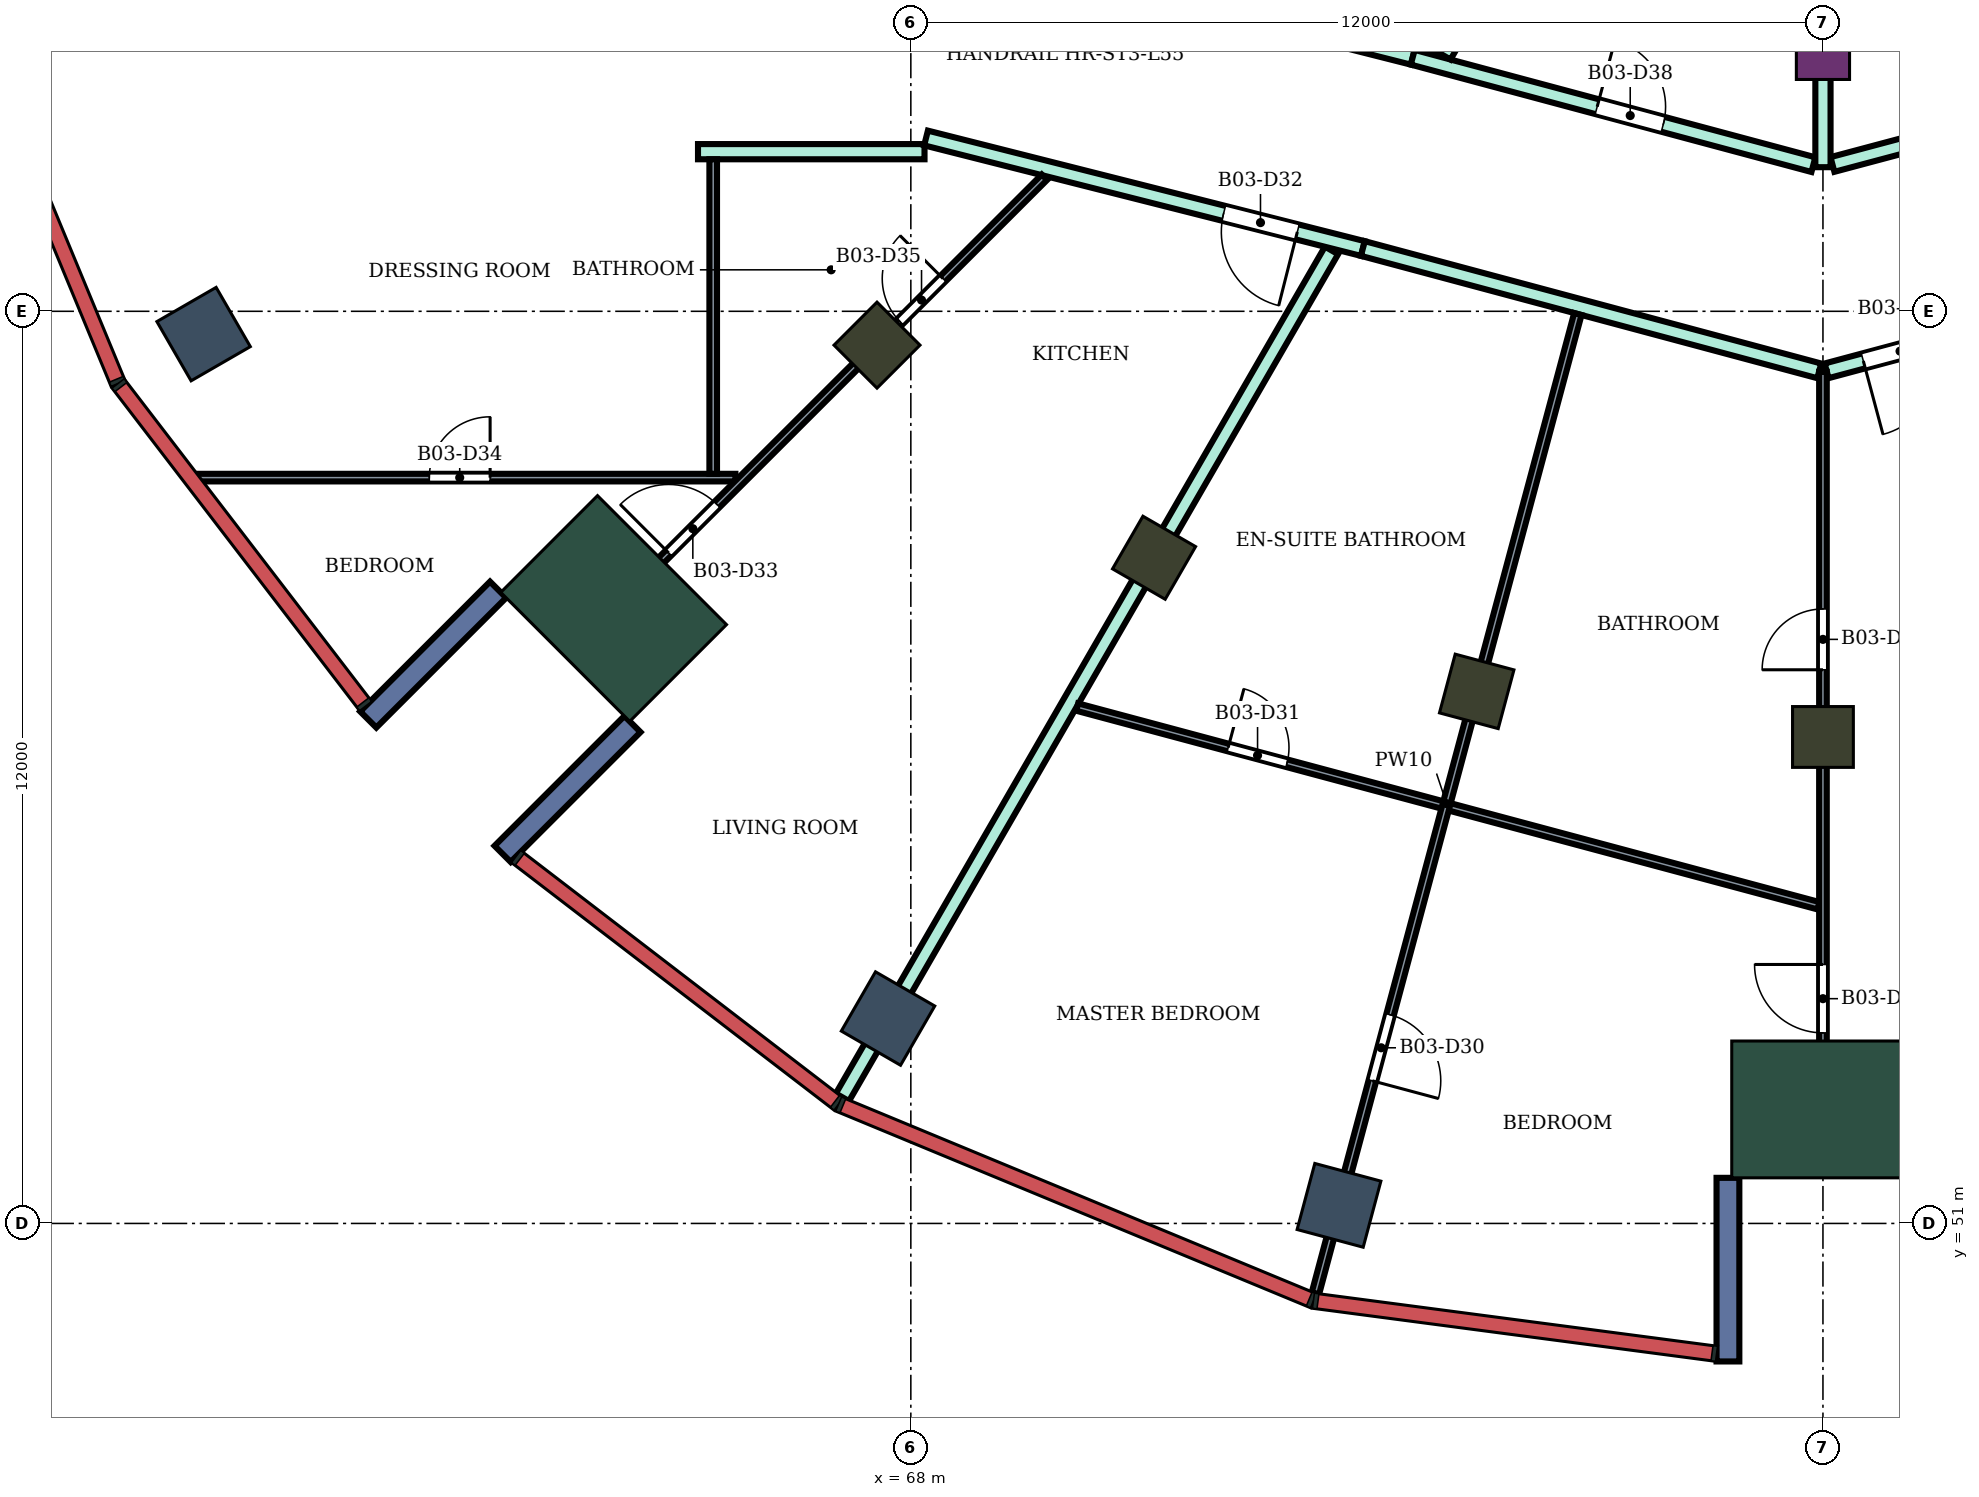
"""IFC4 building model, lengths in metres.
Left out: names, types, materials, properties, quantities, classifications, styles, units other than length and angle.
Written with IfcOpenShell. Run it as: python <this file> out.ifc"""

import sys

from ifc_helpers import new_model, si_unit, direction, frame, frame_2d, origin, origin_2d, place, context, subcontext, project, spatial, rectangle, extrude, element, fill, save


model = new_model("IFC4")
c1 = context("Model", 3, precision=1e-05, world=origin(), true_north=direction((0.0, 1.0)))
c2 = subcontext(c1, "Body", "Model", "MODEL_VIEW")
j1 = project(units=[si_unit("LENGTHUNIT", "METRE"), si_unit("PLANEANGLEUNIT", "RADIAN")], contexts=[c1])
p1 = place(None, origin())
s1 = spatial("IfcSite", under=j1, at=p1, CompositionType="ELEMENT")
p2 = place(p1, origin())
s2 = spatial("IfcBuilding", under=s1, at=p2, CompositionType="ELEMENT")
p3 = place(p2, frame((0.0, 0.0, 241.5)))
s3 = spatial("IfcBuildingStorey", under=s2, at=p3, CompositionType="ELEMENT", Elevation=241.5)
for number, where, z_axis, x_axis in (
    (1, (58.696, 62.7, 0.0), (0.0, 0.0, 1.0), (-0.866, -0.5, 0.0)),
    (2, (67.7, 53.696, 0.0), (0.0, 0.0, 1.0), (-0.5, -0.866, 0.0)),
    (3, (73.633, 51.238, 0.0), (0.0, 0.0, 1.0), (-0.259, -0.966, 0.0)),
):
    element("IfcColumn", number, at=place(p3, frame(where, z_axis=z_axis, x_axis=x_axis)), inside=s3, PredefinedType="COLUMN", context=c2, shape_type="SweptSolid", body=[
        extrude(rectangle(XDim=0.9, YDim=0.9, at=origin_2d()), origin(), (0.0, 0.0, 1.0), 4.2),
    ])
for number, where, z_axis, x_axis in (
    (4, (67.555, 62.555, 0.0), (0.0, 0.0, 1.0), (-0.707, -0.707, 0.0)),
    (5, (71.2, 59.758, 0.0), (0.0, 0.0, 1.0), (-0.5, -0.866, 0.0)),
    (6, (75.445, 58.0, 0.0), (0.0, 0.0, 1.0), (-0.259, -0.966, 0.0)),
    (7, (80.0, 57.4, 0.0), (0.0, 0.0, 1.0), (0.0, -1.0, 0.0)),
):
    element("IfcColumn", number, at=place(p3, frame(where, z_axis=z_axis, x_axis=x_axis)), inside=s3, PredefinedType="COLUMN", context=c2, shape_type="SweptSolid", body=[
        extrude(rectangle(XDim=0.8, YDim=0.8, at=origin_2d()), origin(), (0.0, 0.0, 1.0), 4.2),
    ])
p4 = place(p3, frame((80.0, 66.4, 0.0), z_axis=(0.0, 0.0, 1.0), x_axis=(0.0, -1.0, 0.0)))
e8 = element("IfcColumn", 8, at=p4, inside=s3, PredefinedType="COLUMN", context=c2, shape_type="SweptSolid", body=[
    extrude(rectangle(XDim=0.7, YDim=0.7, at=origin_2d()), origin(), (0.0, 0.0, 1.0), 4.2),
])
for number, where, z_axis, x_axis in (
    (9, (64.09, 59.09, 0.0), (0.0, 0.0, 1.0), (-0.707, -0.707, 0.0)),
    (10, (80.0, 52.5, 0.0), (0.0, 0.0, 1.0), (0.0, -1.0, 0.0)),
):
    element("IfcColumn", number, at=place(p3, frame(where, z_axis=z_axis, x_axis=x_axis)), inside=s3, PredefinedType="COLUMN", context=c2, shape_type="SweptSolid", body=[
        extrude(rectangle(XDim=1.8, YDim=2.4, at=origin_2d()), origin(), (0.0, 0.0, 1.0), 4.2),
    ])
for number, where, z_axis, x_axis in (
    (11, (62.57, 59.338, 0.0), (0.0, 0.0, 1.0), (-0.707, -0.707, 0.0)),
    (12, (64.338, 57.57, 0.0), (0.0, 0.0, 1.0), (-0.707, -0.707, 0.0)),
    (13, (78.75, 51.6, 0.0), (0.0, 0.0, 1.0), (0.0, -1.0, 0.0)),
):
    element("IfcWall", number, at=place(p3, frame(where, z_axis=z_axis, x_axis=x_axis)), inside=s3, PredefinedType="NOTDEFINED", context=c2, shape_type="SweptSolid", body=[
        extrude(rectangle(XDim=2.416, YDim=0.3, at=frame_2d((1.208, 0.0))), origin(), (0.0, 0.0, 1.0), 4.2),
    ])
p5 = place(p3, frame((65.2, 65.1, 0.0), z_axis=(0.0, 0.0, 1.0), x_axis=(1.0, 0.0, 0.0)))
e14 = element("IfcWall", 14, at=p5, inside=s3, PredefinedType="PARTITIONING", context=c2, shape_type="SweptSolid", body=[
    extrude(rectangle(XDim=2.98, YDim=0.2, at=frame_2d((1.49, 0.0))), origin(), (0.0, 0.0, 1.0), 3.75),
])
p6 = place(p3, frame((67.1, 52.659, 0.0), z_axis=(0.0, 0.0, 1.0), x_axis=(0.500128690501, 0.865951091539, 0.0)))
e15 = element("IfcWall", 15, at=p6, inside=s3, PredefinedType="PARTITIONING", context=c2, shape_type="SweptSolid", body=[
    extrude(rectangle(XDim=12.866, YDim=0.2, at=frame_2d((6.433, 0.0))), origin(), (0.0, 0.0, 1.0), 3.75),
])
p7 = place(p3, frame((68.2, 65.28, 0.0), z_axis=(0.0, 0.0, 1.0), x_axis=(0.969450596516, -0.245286650503, 0.0)))
e16 = element("IfcWall", 16, at=p7, inside=s3, PredefinedType="PARTITIONING", context=c2, shape_type="SweptSolid", body=[
    extrude(rectangle(XDim=5.928, YDim=0.2, at=frame_2d((2.964, 0.0))), origin(), (0.0, 0.0, 1.0), 3.75),
])
p8 = place(p7, frame((4.039, 0.0, 0.0)))
e17 = element("IfcOpeningElement", 17, at=p8, cuts=e16, PredefinedType="OPENING", context=c2, shape_type="SweptSolid", body=[
    extrude(rectangle(XDim=1.0, YDim=2.1, at=frame_2d((0.5, 1.05))), frame((0.0, 0.11, 0.0), z_axis=(0.0, -1.0, 0.0), x_axis=(1.0, 0.0, 0.0)), (0.0, 0.0, 1.0), 0.22),
])
p9 = place(p3, frame((72.1, 66.975, 0.0), z_axis=(0.0, 0.0, 1.0), x_axis=(0.969471314457, -0.245204752086, 0.0)))
e18 = element("IfcWall", 18, at=p9, inside=s3, PredefinedType="PARTITIONING", context=c2, shape_type="SweptSolid", body=[
    extrude(rectangle(XDim=2.582, YDim=0.2, at=frame_2d((1.291, 0.0))), origin(), (0.0, 0.0, 1.0), 3.75),
])
p10 = place(p9, frame((0.841, 0.0, 0.0)))
e19 = element("IfcOpeningElement", 19, at=p10, cuts=e18, PredefinedType="OPENING", context=c2, shape_type="SweptSolid", body=[
    extrude(rectangle(XDim=0.9, YDim=2.1, at=frame_2d((0.45, 1.05))), frame((0.0, 0.11, 0.0), z_axis=(0.0, -1.0, 0.0), x_axis=(1.0, 0.0, 0.0)), (0.0, 0.0, 1.0), 0.22),
])
p11 = place(p3, frame((73.947, 63.826, 0.0), z_axis=(0.0, 0.0, 1.0), x_axis=(0.965908253407, -0.258884619088, 0.0)))
e20 = element("IfcWall", 20, at=p11, inside=s3, PredefinedType="PARTITIONING", context=c2, shape_type="SweptSolid", body=[
    extrude(rectangle(XDim=6.217, YDim=0.2, at=frame_2d((3.108, 0.0))), origin(), (0.0, 0.0, 1.0), 3.75),
])
p12 = place(p3, frame((74.603, 66.342, 0.0), z_axis=(0.0, 0.0, 1.0), x_axis=(0.965920893652, -0.258837453254, 0.0)))
e21 = element("IfcWall", 21, at=p12, inside=s3, PredefinedType="PARTITIONING", context=c2, shape_type="SweptSolid", body=[
    extrude(rectangle(XDim=5.458, YDim=0.2, at=frame_2d((2.729, 0.0))), origin(), (0.0, 0.0, 1.0), 3.75),
])
p13 = place(p12, frame((2.512, 0.0, 0.0)))
e22 = element("IfcOpeningElement", 22, at=p13, cuts=e21, PredefinedType="OPENING", context=c2, shape_type="SweptSolid", body=[
    extrude(rectangle(XDim=0.9, YDim=2.1, at=frame_2d((0.45, 1.05))), frame((0.0, 0.11, 0.0), z_axis=(0.0, -1.0, 0.0), x_axis=(1.0, 0.0, 0.0)), (0.0, 0.0, 1.0), 0.22),
])
p14 = place(p3, frame((75.014, 66.362, 0.0), z_axis=(0.0, 0.0, 1.0), x_axis=(0.500097042406, 0.865969369075, 0.0)))
e23 = element("IfcWall", 23, at=p14, inside=s3, PredefinedType="PARTITIONING", context=c2, shape_type="SweptSolid", body=[
    extrude(rectangle(XDim=2.275, YDim=0.2, at=frame_2d((1.138, 0.0))), origin(), (0.0, 0.0, 1.0), 3.75),
])
p15 = place(p3, frame((80.125, 64.932, 0.0), z_axis=(0.0, 0.0, 1.0), x_axis=(0.966236955806, 0.257655089674, 0.0)))
e24 = element("IfcWall", 24, at=p15, inside=s3, PredefinedType="PARTITIONING", context=c2, shape_type="SweptSolid", body=[
    extrude(rectangle(XDim=8.039, YDim=0.2, at=frame_2d((4.02, 0.0))), origin(), (0.0, 0.0, 1.0), 3.75),
])
p16 = place(p15, frame((6.298, 0.0, 0.0)))
e25 = element("IfcOpeningElement", 25, at=p16, cuts=e24, PredefinedType="OPENING", context=c2, shape_type="SweptSolid", body=[
    extrude(rectangle(XDim=0.9, YDim=2.1, at=frame_2d((0.45, 1.05))), frame((0.0, 0.11, 0.0), z_axis=(0.0, -1.0, 0.0), x_axis=(1.0, 0.0, 0.0)), (0.0, 0.0, 1.0), 0.22),
])
p17 = place(p15, frame((2.045, 0.0, 0.0)))
e26 = element("IfcOpeningElement", 26, at=p17, cuts=e24, PredefinedType="OPENING", context=c2, shape_type="SweptSolid", body=[
    extrude(rectangle(XDim=0.9, YDim=2.1, at=frame_2d((0.45, 1.05))), frame((0.0, 0.11, 0.0), z_axis=(0.0, -1.0, 0.0), x_axis=(1.0, 0.0, 0.0)), (0.0, 0.0, 1.0), 0.22),
])
p18 = place(p3, frame((80.048, 62.217, 0.0), z_axis=(0.0, 0.0, 1.0), x_axis=(0.965941520544, 0.258760466242, 0.0)))
e27 = element("IfcWall", 27, at=p18, inside=s3, PredefinedType="PARTITIONING", context=c2, shape_type="SweptSolid", body=[
    extrude(rectangle(XDim=6.006, YDim=0.2, at=frame_2d((3.003, 0.0))), origin(), (0.0, 0.0, 1.0), 3.75),
])
p19 = place(p18, frame((0.5, 0.0, 0.0)))
e28 = element("IfcOpeningElement", 28, at=p19, cuts=e27, PredefinedType="OPENING", context=c2, shape_type="SweptSolid", body=[
    extrude(rectangle(XDim=1.0, YDim=2.1, at=frame_2d((0.5, 1.05))), frame((0.0, 0.11, 0.0), z_axis=(0.0, -1.0, 0.0), x_axis=(1.0, 0.0, 0.0)), (0.0, 0.0, 1.0), 0.22),
])
p20 = place(p3, frame((80.0, 64.896, 0.0), z_axis=(0.0, 0.0, 1.0), x_axis=(0.0, 1.0, 0.0)))
e29 = element("IfcWall", 29, at=p20, inside=s3, PredefinedType="PARTITIONING", context=c2, shape_type="SweptSolid", body=[
    extrude(rectangle(XDim=2.405, YDim=0.2, at=frame_2d((1.203, 0.0))), origin(), (0.0, 0.0, 1.0), 3.75),
])
p21 = place(p3, frame((58.6, 60.812, 0.0), z_axis=(0.0, 0.0, 1.0), x_axis=(1.0, 0.0, 0.0)))
e30 = element("IfcWall", 30, at=p21, inside=s3, PredefinedType="PARTITIONING", context=c2, shape_type="SweptSolid", body=[
    extrude(rectangle(XDim=7.092, YDim=0.1, at=frame_2d((3.546, 0.0))), origin(), (0.0, 0.0, 1.0), 3.75),
])
p22 = place(p21, frame((3.065, 0.0, 0.0)))
e31 = element("IfcOpeningElement", 31, at=p22, cuts=e30, PredefinedType="OPENING", context=c2, shape_type="SweptSolid", body=[
    extrude(rectangle(XDim=0.8, YDim=2.1, at=frame_2d((0.4, 1.05))), frame((0.0, 0.06, 0.0), z_axis=(0.0, -1.0, 0.0), x_axis=(1.0, 0.0, 0.0)), (0.0, 0.0, 1.0), 0.12),
])
p23 = place(p3, frame((63.591, 58.6, 0.0), z_axis=(0.0, 0.0, 1.0), x_axis=(0.707274766636, 0.70693875582, 0.0)))
e32 = element("IfcWall", 32, at=p23, inside=s3, PredefinedType="PARTITIONING", context=c2, shape_type="SweptSolid", body=[
    extrude(rectangle(XDim=8.719, YDim=0.1, at=frame_2d((4.359, 0.0))), origin(), (0.0, 0.0, 1.0), 3.75),
])
p24 = place(p23, frame((1.729, 0.0, 0.0)))
e33 = element("IfcOpeningElement", 33, at=p24, cuts=e32, PredefinedType="OPENING", context=c2, shape_type="SweptSolid", body=[
    extrude(rectangle(XDim=0.9, YDim=2.1, at=frame_2d((0.45, 1.05))), frame((0.0, 0.06, 0.0), z_axis=(0.0, -1.0, 0.0), x_axis=(1.0, 0.0, 0.0)), (0.0, 0.0, 1.0), 0.12),
])
p25 = place(p23, frame((6.033, 0.0, 0.0)))
e34 = element("IfcOpeningElement", 34, at=p25, cuts=e32, PredefinedType="OPENING", context=c2, shape_type="SweptSolid", body=[
    extrude(rectangle(XDim=0.8, YDim=2.1, at=frame_2d((0.4, 1.05))), frame((0.0, 0.06, 0.0), z_axis=(0.0, -1.0, 0.0), x_axis=(1.0, 0.0, 0.0)), (0.0, 0.0, 1.0), 0.12),
])
p26 = place(p3, frame((65.4, 60.862, 0.0), z_axis=(0.0, 0.0, 1.0), x_axis=(0.0, 1.0, 0.0)))
e35 = element("IfcWall", 35, at=p26, inside=s3, PredefinedType="PARTITIONING", context=c2, shape_type="SweptSolid", body=[
    extrude(rectangle(XDim=4.138, YDim=0.1, at=frame_2d((2.069, 0.0))), origin(), (0.0, 0.0, 1.0), 3.75),
])
p27 = place(p3, frame((70.188, 57.793, 0.0), z_axis=(0.0, 0.0, 1.0), x_axis=(0.965911138035, -0.258873856194, 0.0)))
e36 = element("IfcWall", 36, at=p27, inside=s3, PredefinedType="PARTITIONING", context=c2, shape_type="SweptSolid", body=[
    extrude(rectangle(XDim=10.098, YDim=0.1, at=frame_2d((5.049, 0.0))), origin(), (0.0, 0.0, 1.0), 3.75),
])
p28 = place(p27, frame((2.057, 0.0, 0.0)))
e37 = element("IfcOpeningElement", 37, at=p28, cuts=e36, PredefinedType="OPENING", context=c2, shape_type="SweptSolid", body=[
    extrude(rectangle(XDim=0.8, YDim=2.1, at=frame_2d((0.4, 1.05))), frame((0.0, 0.06, 0.0), z_axis=(0.0, -1.0, 0.0), x_axis=(1.0, 0.0, 0.0)), (0.0, 0.0, 1.0), 0.12),
])
p29 = place(p3, frame((73.323, 50.081, 0.0), z_axis=(0.0, 0.0, 1.0), x_axis=(0.258837030899, 0.96592100683, 0.0)))
e38 = element("IfcWall", 38, at=p29, inside=s3, PredefinedType="PARTITIONING", context=c2, shape_type="SweptSolid", body=[
    extrude(rectangle(XDim=13.338, YDim=0.1, at=frame_2d((6.669, 0.0))), origin(), (0.0, 0.0, 1.0), 3.75),
])
p30 = place(p29, frame((2.894, 0.0, 0.0)))
e39 = element("IfcOpeningElement", 39, at=p30, cuts=e38, PredefinedType="OPENING", context=c2, shape_type="SweptSolid", body=[
    extrude(rectangle(XDim=0.9, YDim=2.1, at=frame_2d((0.45, 1.05))), frame((0.0, 0.06, 0.0), z_axis=(0.0, -1.0, 0.0), x_axis=(1.0, 0.0, 0.0)), (0.0, 0.0, 1.0), 0.12),
])
p31 = place(p3, frame((80.0, 51.8, 0.0), z_axis=(0.0, 0.0, 1.0), x_axis=(0.0, 1.0, 0.0)))
e40 = element("IfcWall", 40, at=p31, inside=s3, PredefinedType="PARTITIONING", context=c2, shape_type="SweptSolid", body=[
    extrude(rectangle(XDim=10.404, YDim=0.1, at=frame_2d((5.202, 0.0))), origin(), (0.0, 0.0, 1.0), 3.75),
])
p32 = place(p31, frame((1.707, 0.0, 0.0)))
e41 = element("IfcOpeningElement", 41, at=p32, cuts=e40, PredefinedType="OPENING", context=c2, shape_type="SweptSolid", body=[
    extrude(rectangle(XDim=0.9, YDim=2.1, at=frame_2d((0.45, 1.05))), frame((0.0, 0.06, 0.0), z_axis=(0.0, -1.0, 0.0), x_axis=(1.0, 0.0, 0.0)), (0.0, 0.0, 1.0), 0.12),
])
p33 = place(p31, frame((6.484, 0.0, 0.0)))
e42 = element("IfcOpeningElement", 42, at=p33, cuts=e40, PredefinedType="OPENING", context=c2, shape_type="SweptSolid", body=[
    extrude(rectangle(XDim=0.8, YDim=2.1, at=frame_2d((0.4, 1.05))), frame((0.0, 0.06, 0.0), z_axis=(0.0, -1.0, 0.0), x_axis=(1.0, 0.0, 0.0)), (0.0, 0.0, 1.0), 0.12),
])
p34 = place(p19, frame((1.0, 0.0, 0.0), z_axis=(0.0, 0.0, 1.0), x_axis=(-1.0, 0.0, 0.0)))
e43 = element("IfcDoor", 43, at=p34, inside=s3, OperationType="SINGLE_SWING_RIGHT", PredefinedType="DOOR", context=c2, shape_type="SweptSolid", body=[
    extrude(rectangle(XDim=1.0, YDim=2.1, at=frame_2d((0.5, 1.05))), frame((0.0, 0.025, 0.0), z_axis=(0.0, -1.0, 0.0), x_axis=(1.0, 0.0, 0.0)), (0.0, 0.0, 1.0), 0.05),
])
fill(e28, e43)
p35 = place(p32, origin())
e44 = element("IfcDoor", 44, at=p35, inside=s3, OperationType="SINGLE_SWING_RIGHT", PredefinedType="DOOR", context=c2, shape_type="SweptSolid", body=[
    extrude(rectangle(XDim=0.9, YDim=2.1, at=frame_2d((0.45, 1.05))), frame((0.0, 0.025, 0.0), z_axis=(0.0, -1.0, 0.0), x_axis=(1.0, 0.0, 0.0)), (0.0, 0.0, 1.0), 0.05),
])
fill(e41, e44)
p36 = place(p33, origin())
e45 = element("IfcDoor", 45, at=p36, inside=s3, OperationType="SINGLE_SWING_LEFT", PredefinedType="DOOR", context=c2, shape_type="SweptSolid", body=[
    extrude(rectangle(XDim=0.8, YDim=2.1, at=frame_2d((0.4, 1.05))), frame((0.0, 0.025, 0.0), z_axis=(0.0, -1.0, 0.0), x_axis=(1.0, 0.0, 0.0)), (0.0, 0.0, 1.0), 0.05),
])
fill(e42, e45)
p37 = place(p30, frame((0.9, 0.0, 0.0), z_axis=(0.0, 0.0, 1.0), x_axis=(-1.0, 0.0, 0.0)))
e46 = element("IfcDoor", 46, at=p37, inside=s3, OperationType="SINGLE_SWING_RIGHT", PredefinedType="DOOR", context=c2, shape_type="SweptSolid", body=[
    extrude(rectangle(XDim=0.9, YDim=2.1, at=frame_2d((0.45, 1.05))), frame((0.0, 0.025, 0.0), z_axis=(0.0, -1.0, 0.0), x_axis=(1.0, 0.0, 0.0)), (0.0, 0.0, 1.0), 0.05),
])
fill(e39, e46)
p38 = place(p28, origin())
e47 = element("IfcDoor", 47, at=p38, inside=s3, OperationType="SINGLE_SWING_LEFT", PredefinedType="DOOR", context=c2, shape_type="SweptSolid", body=[
    extrude(rectangle(XDim=0.8, YDim=2.1, at=frame_2d((0.4, 1.05))), frame((0.0, 0.025, 0.0), z_axis=(0.0, -1.0, 0.0), x_axis=(1.0, 0.0, 0.0)), (0.0, 0.0, 1.0), 0.05),
])
fill(e37, e47)
p39 = place(p8, frame((1.0, 0.0, 0.0), z_axis=(0.0, 0.0, 1.0), x_axis=(-1.0, 0.0, 0.0)))
e48 = element("IfcDoor", 48, at=p39, inside=s3, OperationType="SINGLE_SWING_LEFT", PredefinedType="DOOR", context=c2, shape_type="SweptSolid", body=[
    extrude(rectangle(XDim=1.0, YDim=2.1, at=frame_2d((0.5, 1.05))), frame((0.0, 0.025, 0.0), z_axis=(0.0, -1.0, 0.0), x_axis=(1.0, 0.0, 0.0)), (0.0, 0.0, 1.0), 0.05),
])
fill(e17, e48)
p40 = place(p24, origin())
e49 = element("IfcDoor", 49, at=p40, inside=s3, OperationType="SINGLE_SWING_LEFT", PredefinedType="DOOR", context=c2, shape_type="SweptSolid", body=[
    extrude(rectangle(XDim=0.9, YDim=2.1, at=frame_2d((0.45, 1.05))), frame((0.0, 0.025, 0.0), z_axis=(0.0, -1.0, 0.0), x_axis=(1.0, 0.0, 0.0)), (0.0, 0.0, 1.0), 0.05),
])
fill(e33, e49)
p41 = place(p22, origin())
e50 = element("IfcDoor", 50, at=p41, inside=s3, OperationType="SINGLE_SWING_RIGHT", PredefinedType="DOOR", context=c2, shape_type="SweptSolid", body=[
    extrude(rectangle(XDim=0.8, YDim=2.1, at=frame_2d((0.4, 1.05))), frame((0.0, 0.025, 0.0), z_axis=(0.0, -1.0, 0.0), x_axis=(1.0, 0.0, 0.0)), (0.0, 0.0, 1.0), 0.05),
])
fill(e31, e50)
p42 = place(p25, origin())
e51 = element("IfcDoor", 51, at=p42, inside=s3, OperationType="SINGLE_SWING_RIGHT", PredefinedType="DOOR", context=c2, shape_type="SweptSolid", body=[
    extrude(rectangle(XDim=0.8, YDim=2.1, at=frame_2d((0.4, 1.05))), frame((0.0, 0.025, 0.0), z_axis=(0.0, -1.0, 0.0), x_axis=(1.0, 0.0, 0.0)), (0.0, 0.0, 1.0), 0.05),
])
fill(e34, e51)
p43 = place(p13, origin())
e52 = element("IfcDoor", 52, at=p43, inside=s3, OperationType="SINGLE_SWING_LEFT", PredefinedType="DOOR", context=c2, shape_type="SweptSolid", body=[
    extrude(rectangle(XDim=0.9, YDim=2.1, at=frame_2d((0.45, 1.05))), frame((0.0, 0.025, 0.0), z_axis=(0.0, -1.0, 0.0), x_axis=(1.0, 0.0, 0.0)), (0.0, 0.0, 1.0), 0.05),
])
fill(e22, e52)
save(model, sys.argv[1])
